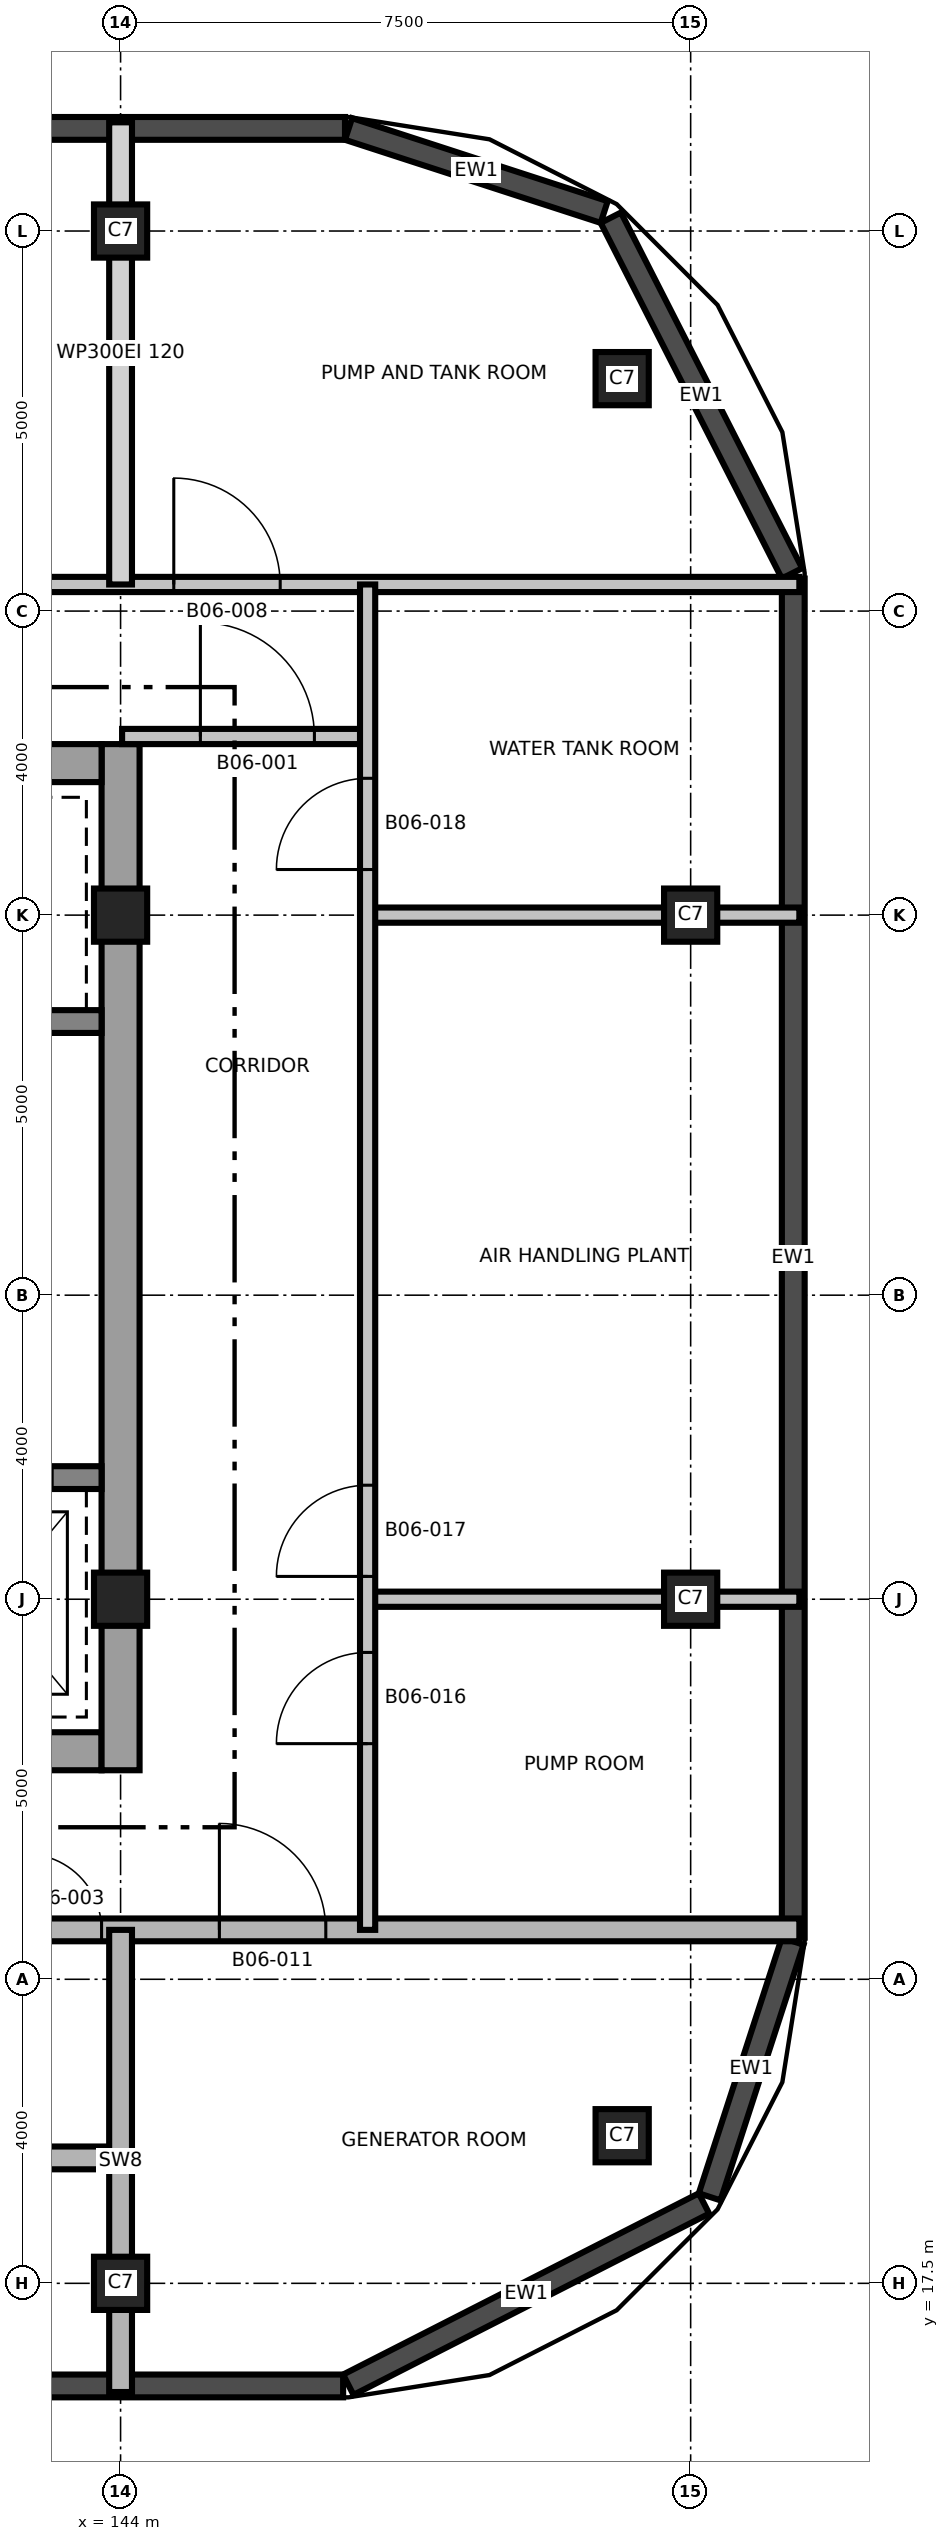
"""IFC4 building model, lengths in metres.
Left out: names, types, materials, properties, quantities, classifications, styles, units other than length and angle.
Written with IfcOpenShell. Run it as: python <this file> out.ifc"""

import sys

from ifc_helpers import new_model, si_unit, direction, frame, frame_2d, origin, origin_2d, place, context, subcontext, project, spatial, rectangle, extrude, element, fill, save


model = new_model("IFC4")
c1 = context("Model", 3, precision=1e-05, world=origin(), true_north=direction((0.0, 1.0)))
c2 = subcontext(c1, "Body", "Model", "MODEL_VIEW")
j1 = project(units=[si_unit("LENGTHUNIT", "METRE"), si_unit("PLANEANGLEUNIT", "RADIAN")], contexts=[c1])
p1 = place(None, origin())
s1 = spatial("IfcSite", under=j1, at=p1, CompositionType="ELEMENT")
p2 = place(p1, origin())
s2 = spatial("IfcBuilding", under=s1, at=p2, CompositionType="ELEMENT")
p3 = place(p2, frame((0.0, 0.0, 81.6)))
s3 = spatial("IfcBuildingStorey", under=s2, at=p3, CompositionType="ELEMENT", Elevation=81.6)
p4 = place(p3, frame((128.75, 24.5, 0.0), z_axis=(0.0, 0.0, 1.0), x_axis=(1.0, 0.0, 0.0)))
e1 = element("IfcWall", 1, at=p4, inside=s3, PredefinedType="SHEAR", context=c2, shape_type="SweptSolid", body=[
    extrude(rectangle(XDim=15.0, YDim=0.5, at=frame_2d((7.5, 0.0))), origin(), (0.0, 0.0, 1.0), 5.5),
])
p5 = place(p4, frame((9.65, 0.0, 0.0)))
e2 = element("IfcOpeningElement", 2, at=p5, cuts=e1, PredefinedType="OPENING", context=c2, shape_type="SweptSolid", body=[
    extrude(rectangle(XDim=1.5, YDim=2.1, at=frame_2d((0.75, 1.05))), frame((0.0, 0.26, 0.0), z_axis=(0.0, -1.0, 0.0), x_axis=(1.0, 0.0, 0.0)), (0.0, 0.0, 1.0), 0.52),
])
p6 = place(p4, frame((1.25, 0.0, 0.0)))
e3 = element("IfcOpeningElement", 3, at=p6, cuts=e1, PredefinedType="OPENING", context=c2, shape_type="SweptSolid", body=[
    extrude(rectangle(XDim=0.9, YDim=2.1, at=frame_2d((0.45, 1.05))), frame((0.0, 0.26, 0.0), z_axis=(0.0, -1.0, 0.0), x_axis=(1.0, 0.0, 0.0)), (0.0, 0.0, 1.0), 0.52),
])
p7 = place(p3, frame((144.0, 24.25, 0.0), z_axis=(0.0, 0.0, 1.0), x_axis=(0.0, 1.0, 0.0)))
e4 = element("IfcWall", 4, at=p7, inside=s3, PredefinedType="SHEAR", context=c2, shape_type="SweptSolid", body=[
    extrude(rectangle(XDim=13.5, YDim=0.5, at=frame_2d((6.75, 0.0))), origin(), (0.0, 0.0, 1.0), 5.5),
])
p8 = place(p3, frame((128.75, 37.5, 0.0), z_axis=(0.0, 0.0, 1.0), x_axis=(1.0, 0.0, 0.0)))
e5 = element("IfcWall", 5, at=p8, inside=s3, PredefinedType="SHEAR", context=c2, shape_type="SweptSolid", body=[
    extrude(rectangle(XDim=15.0, YDim=0.5, at=frame_2d((7.5, 0.0))), origin(), (0.0, 0.0, 1.0), 5.5),
])
p9 = place(p8, frame((9.65, 0.0, 0.0)))
e6 = element("IfcOpeningElement", 6, at=p9, cuts=e5, PredefinedType="OPENING", context=c2, shape_type="SweptSolid", body=[
    extrude(rectangle(XDim=1.5, YDim=2.1, at=frame_2d((0.75, 1.05))), frame((0.0, 0.26, 0.0), z_axis=(0.0, -1.0, 0.0), x_axis=(1.0, 0.0, 0.0)), (0.0, 0.0, 1.0), 0.52),
])
p10 = place(p8, frame((12.85, 0.0, 0.0)))
e7 = element("IfcOpeningElement", 7, at=p10, cuts=e5, PredefinedType="OPENING", context=c2, shape_type="SweptSolid", body=[
    extrude(rectangle(XDim=0.9, YDim=2.1, at=frame_2d((0.45, 1.05))), frame((0.0, 0.26, 0.0), z_axis=(0.0, -1.0, 0.0), x_axis=(1.0, 0.0, 0.0)), (0.0, 0.0, 1.0), 0.52),
])
p11 = place(p8, frame((3.8, 0.0, 0.0)))
e8 = element("IfcOpeningElement", 8, at=p11, cuts=e5, PredefinedType="OPENING", context=c2, shape_type="SweptSolid", body=[
    extrude(rectangle(XDim=0.9, YDim=2.1, at=frame_2d((0.45, 1.05))), frame((0.0, 0.26, 0.0), z_axis=(0.0, -1.0, 0.0), x_axis=(1.0, 0.0, 0.0)), (0.0, 0.0, 1.0), 0.52),
])
p12 = place(p8, frame((5.8, 0.0, 0.0)))
e9 = element("IfcOpeningElement", 9, at=p12, cuts=e5, PredefinedType="OPENING", context=c2, shape_type="SweptSolid", body=[
    extrude(rectangle(XDim=0.9, YDim=2.1, at=frame_2d((0.45, 1.05))), frame((0.0, 0.26, 0.0), z_axis=(0.0, -1.0, 0.0), x_axis=(1.0, 0.0, 0.0)), (0.0, 0.0, 1.0), 0.52),
])
p13 = place(p8, frame((7.55, 0.0, 0.0)))
e10 = element("IfcOpeningElement", 10, at=p13, cuts=e5, PredefinedType="OPENING", context=c2, shape_type="SweptSolid", body=[
    extrude(rectangle(XDim=0.9, YDim=2.1, at=frame_2d((0.45, 1.05))), frame((0.0, 0.26, 0.0), z_axis=(0.0, -1.0, 0.0), x_axis=(1.0, 0.0, 0.0)), (0.0, 0.0, 1.0), 0.52),
])
p14 = place(p3, frame((141.05, 28.1, 0.0), z_axis=(0.0, 0.0, 1.0), x_axis=(1.0, 0.0, 0.0)))
e11 = element("IfcWall", 11, at=p14, inside=s3, PredefinedType="SHEAR", context=c2, shape_type="SweptSolid", body=[
    extrude(rectangle(XDim=2.7, YDim=0.3, at=frame_2d((1.35, 0.0))), origin(), (0.0, 0.0, 1.0), 5.5),
])
p15 = place(p14, frame((0.75, 0.0, 0.0)))
e12 = element("IfcOpeningElement", 12, at=p15, cuts=e11, PredefinedType="OPENING", context=c2, shape_type="SweptSolid", body=[
    extrude(rectangle(XDim=1.3, YDim=2.4, at=frame_2d((0.65, 1.2))), frame((0.0, 0.16, 0.0), z_axis=(0.0, -1.0, 0.0), x_axis=(1.0, 0.0, 0.0)), (0.0, 0.0, 1.0), 0.32),
])
p16 = place(p3, frame((141.05, 34.1, 0.0), z_axis=(0.0, 0.0, 1.0), x_axis=(1.0, 0.0, 0.0)))
e13 = element("IfcWall", 13, at=p16, inside=s3, PredefinedType="SHEAR", context=c2, shape_type="SweptSolid", body=[
    extrude(rectangle(XDim=2.7, YDim=0.3, at=frame_2d((1.35, 0.0))), origin(), (0.0, 0.0, 1.0), 5.5),
])
for number, where, z_axis, x_axis in (
    (14, (144.0, 17.5, 0.0), (0.0, 0.0, 1.0), (1.0, 0.0, 0.0)),
    (15, (150.599, 19.442, 0.0), (0.0, 0.0, 1.0), (1.0, 0.0, 0.0)),
    (16, (144.0, 26.5, 0.0), (0.0, 0.0, 1.0), (1.0, 0.0, 0.0)),
    (17, (151.5, 26.5, 0.0), (0.0, 0.0, 1.0), (1.0, 0.0, 0.0)),
    (18, (144.0, 35.5, 0.0), (0.0, 0.0, 1.0), (1.0, 0.0, 0.0)),
    (19, (151.5, 35.5, 0.0), (0.0, 0.0, 1.0), (1.0, 0.0, 0.0)),
    (20, (150.599, 42.558, 0.0), (0.0, 0.0, 1.0), (1.0, 0.0, 0.0)),
    (21, (144.0, 44.5, 0.0), (0.0, 0.0, 1.0), (1.0, 0.0, 0.0)),
):
    element("IfcColumn", number, at=place(p3, frame(where, z_axis=z_axis, x_axis=x_axis)), inside=s3, PredefinedType="COLUMN", context=c2, shape_type="SweptSolid", body=[
        extrude(rectangle(XDim=0.7, YDim=0.7, at=origin_2d()), origin(), (0.0, 0.0, 1.0), 5.5),
    ])
p17 = place(p3, frame((126.048, 16.15, 0.0), z_axis=(0.0, 0.0, 1.0), x_axis=(1.0, 0.0, 0.0)))
e22 = element("IfcWall", 22, at=p17, inside=s3, PredefinedType="SOLIDWALL", context=c2, shape_type="SweptSolid", body=[
    extrude(rectangle(XDim=20.88, YDim=0.3, at=frame_2d((10.44, 0.0))), origin(), (0.0, 0.0, 1.0), 5.2),
])
p18 = place(p3, frame((146.996, 16.166, 0.0), z_axis=(0.0, 0.0, 1.0), x_axis=(0.890998339455, 0.454006562826, 0.0)))
e23 = element("IfcWall", 23, at=p18, inside=s3, PredefinedType="SOLIDWALL", context=c2, shape_type="SweptSolid", body=[
    extrude(rectangle(XDim=5.252, YDim=0.3, at=frame_2d((2.626, 0.0))), origin(), (0.0, 0.0, 1.0), 5.2),
])
p19 = place(p3, frame((151.75, 18.638, 0.0), z_axis=(0.0, 0.0, 1.0), x_axis=(0.309073584194, 0.951038127287, 0.0)))
e24 = element("IfcWall", 24, at=p19, inside=s3, PredefinedType="SOLIDWALL", context=c2, shape_type="SweptSolid", body=[
    extrude(rectangle(XDim=3.536, YDim=0.3, at=frame_2d((1.768, 0.0))), origin(), (0.0, 0.0, 1.0), 5.2),
])
p20 = place(p3, frame((152.85, 22.048, 0.0), z_axis=(0.0, 0.0, 1.0), x_axis=(0.0, 1.0, 0.0)))
e25 = element("IfcWall", 25, at=p20, inside=s3, PredefinedType="SOLIDWALL", context=c2, shape_type="SweptSolid", body=[
    extrude(rectangle(XDim=17.88, YDim=0.3, at=frame_2d((8.94, 0.0))), origin(), (0.0, 0.0, 1.0), 5.2),
])
p21 = place(p3, frame((152.834, 39.996, 0.0), z_axis=(0.0, 0.0, 1.0), x_axis=(-0.454006562826, 0.890998339455, 0.0)))
e26 = element("IfcWall", 26, at=p21, inside=s3, PredefinedType="SOLIDWALL", context=c2, shape_type="SweptSolid", body=[
    extrude(rectangle(XDim=5.252, YDim=0.3, at=frame_2d((2.626, 0.0))), origin(), (0.0, 0.0, 1.0), 5.2),
])
p22 = place(p3, frame((150.362, 44.75, 0.0), z_axis=(0.0, 0.0, 1.0), x_axis=(-0.951038127287, 0.309073584194, 0.0)))
e27 = element("IfcWall", 27, at=p22, inside=s3, PredefinedType="SOLIDWALL", context=c2, shape_type="SweptSolid", body=[
    extrude(rectangle(XDim=3.536, YDim=0.3, at=frame_2d((1.768, 0.0))), origin(), (0.0, 0.0, 1.0), 5.2),
])
p23 = place(p3, frame((146.952, 45.85, 0.0), z_axis=(0.0, 0.0, 1.0), x_axis=(-1.0, 0.0, 0.0)))
e28 = element("IfcWall", 28, at=p23, inside=s3, PredefinedType="SOLIDWALL", context=c2, shape_type="SweptSolid", body=[
    extrude(rectangle(XDim=20.88, YDim=0.3, at=frame_2d((10.44, 0.0))), origin(), (0.0, 0.0, 1.0), 5.2),
])
p24 = place(p3, frame((138.25, 19.15, 0.0), z_axis=(0.0, 0.0, 1.0), x_axis=(1.0, 0.0, 0.0)))
e29 = element("IfcWall", 29, at=p24, inside=s3, PredefinedType="SHEAR", context=c2, shape_type="SweptSolid", body=[
    extrude(rectangle(XDim=5.75, YDim=0.3, at=frame_2d((2.875, 0.0))), origin(), (0.0, 0.0, 1.0), 5.2),
])
p25 = place(p3, frame((120.07, 22.15, 0.0), z_axis=(0.0, 0.0, 1.0), x_axis=(1.0, 0.0, 0.0)))
e30 = element("IfcWall", 30, at=p25, inside=s3, PredefinedType="SHEAR", context=c2, shape_type="SweptSolid", body=[
    extrude(rectangle(XDim=32.86, YDim=0.3, at=frame_2d((16.43, 0.0))), origin(), (0.0, 0.0, 1.0), 5.2),
])
p26 = place(p25, frame((22.68, 0.0, 0.0)))
e31 = element("IfcOpeningElement", 31, at=p26, cuts=e30, PredefinedType="OPENING", context=c2, shape_type="SweptSolid", body=[
    extrude(rectangle(XDim=1.0, YDim=2.1, at=frame_2d((0.5, 1.05))), frame((0.0, 0.16, 0.0), z_axis=(0.0, -1.0, 0.0), x_axis=(1.0, 0.0, 0.0)), (0.0, 0.0, 1.0), 0.32),
])
p27 = place(p25, frame((6.73, 0.0, 0.0)))
e32 = element("IfcOpeningElement", 32, at=p27, cuts=e30, PredefinedType="OPENING", context=c2, shape_type="SweptSolid", body=[
    extrude(rectangle(XDim=1.4, YDim=2.1, at=frame_2d((0.7, 1.05))), frame((0.0, 0.16, 0.0), z_axis=(0.0, -1.0, 0.0), x_axis=(1.0, 0.0, 0.0)), (0.0, 0.0, 1.0), 0.32),
])
p28 = place(p25, frame((12.23, 0.0, 0.0)))
e33 = element("IfcOpeningElement", 33, at=p28, cuts=e30, PredefinedType="OPENING", context=c2, shape_type="SweptSolid", body=[
    extrude(rectangle(XDim=1.4, YDim=2.1, at=frame_2d((0.7, 1.05))), frame((0.0, 0.16, 0.0), z_axis=(0.0, -1.0, 0.0), x_axis=(1.0, 0.0, 0.0)), (0.0, 0.0, 1.0), 0.32),
])
p29 = place(p25, frame((25.23, 0.0, 0.0)))
e34 = element("IfcOpeningElement", 34, at=p29, cuts=e30, PredefinedType="OPENING", context=c2, shape_type="SweptSolid", body=[
    extrude(rectangle(XDim=1.4, YDim=2.1, at=frame_2d((0.7, 1.05))), frame((0.0, 0.16, 0.0), z_axis=(0.0, -1.0, 0.0), x_axis=(1.0, 0.0, 0.0)), (0.0, 0.0, 1.0), 0.32),
])
p30 = place(p25, frame((16.68, 0.0, 0.0)))
e35 = element("IfcOpeningElement", 35, at=p30, cuts=e30, PredefinedType="OPENING", context=c2, shape_type="SweptSolid", body=[
    extrude(rectangle(XDim=0.9, YDim=2.1, at=frame_2d((0.45, 1.05))), frame((0.0, 0.16, 0.0), z_axis=(0.0, -1.0, 0.0), x_axis=(1.0, 0.0, 0.0)), (0.0, 0.0, 1.0), 0.32),
])
for number, where, z_axis, x_axis in (
    (36, (147.25, 26.5, 0.0), (0.0, 0.0, 1.0), (1.0, 0.0, 0.0)),
    (37, (147.25, 35.5, 0.0), (0.0, 0.0, 1.0), (1.0, 0.0, 0.0)),
):
    element("IfcWall", number, at=place(p3, frame(where, z_axis=z_axis, x_axis=x_axis)), inside=s3, PredefinedType="PARTITIONING", context=c2, shape_type="SweptSolid", body=[
        extrude(rectangle(XDim=5.68, YDim=0.2, at=frame_2d((2.84, 0.0))), origin(), (0.0, 0.0, 1.0), 5.2),
    ])
p31 = place(p3, frame((144.02, 37.85, 0.0), z_axis=(0.0, 0.0, 1.0), x_axis=(1.0, 0.0, 0.0)))
e38 = element("IfcWall", 38, at=p31, inside=s3, PredefinedType="PARTITIONING", context=c2, shape_type="SweptSolid", body=[
    extrude(rectangle(XDim=3.23, YDim=0.2, at=frame_2d((1.615, 0.0))), origin(), (0.0, 0.0, 1.0), 5.2),
])
p32 = place(p31, frame((1.03, 0.0, 0.0)))
e39 = element("IfcOpeningElement", 39, at=p32, cuts=e38, PredefinedType="OPENING", context=c2, shape_type="SweptSolid", body=[
    extrude(rectangle(XDim=1.5, YDim=2.1, at=frame_2d((0.75, 1.05))), frame((0.0, 0.11, 0.0), z_axis=(0.0, -1.0, 0.0), x_axis=(1.0, 0.0, 0.0)), (0.0, 0.0, 1.0), 0.22),
])
p33 = place(p3, frame((120.07, 39.85, 0.0), z_axis=(0.0, 0.0, 1.0), x_axis=(1.0, 0.0, 0.0)))
e40 = element("IfcWall", 40, at=p33, inside=s3, PredefinedType="PARTITIONING", context=c2, shape_type="SweptSolid", body=[
    extrude(rectangle(XDim=32.86, YDim=0.2, at=frame_2d((16.43, 0.0))), origin(), (0.0, 0.0, 1.0), 5.2),
])
p34 = place(p33, frame((11.23, 0.0, 0.0)))
e41 = element("IfcOpeningElement", 41, at=p34, cuts=e40, PredefinedType="OPENING", context=c2, shape_type="SweptSolid", body=[
    extrude(rectangle(XDim=1.4, YDim=2.1, at=frame_2d((0.7, 1.05))), frame((0.0, 0.11, 0.0), z_axis=(0.0, -1.0, 0.0), x_axis=(1.0, 0.0, 0.0)), (0.0, 0.0, 1.0), 0.22),
])
p35 = place(p33, frame((19.23, 0.0, 0.0)))
e42 = element("IfcOpeningElement", 42, at=p35, cuts=e40, PredefinedType="OPENING", context=c2, shape_type="SweptSolid", body=[
    extrude(rectangle(XDim=1.4, YDim=2.1, at=frame_2d((0.7, 1.05))), frame((0.0, 0.11, 0.0), z_axis=(0.0, -1.0, 0.0), x_axis=(1.0, 0.0, 0.0)), (0.0, 0.0, 1.0), 0.22),
])
p36 = place(p33, frame((24.63, 0.0, 0.0)))
e43 = element("IfcOpeningElement", 43, at=p36, cuts=e40, PredefinedType="OPENING", context=c2, shape_type="SweptSolid", body=[
    extrude(rectangle(XDim=1.4, YDim=2.1, at=frame_2d((0.7, 1.05))), frame((0.0, 0.11, 0.0), z_axis=(0.0, -1.0, 0.0), x_axis=(1.0, 0.0, 0.0)), (0.0, 0.0, 1.0), 0.22),
])
p37 = place(p3, frame((144.0, 16.07, 0.0), z_axis=(0.0, 0.0, 1.0), x_axis=(0.0, 1.0, 0.0)))
e44 = element("IfcWall", 44, at=p37, inside=s3, PredefinedType="SHEAR", context=c2, shape_type="SweptSolid", body=[
    extrude(rectangle(XDim=6.08, YDim=0.3, at=frame_2d((3.04, 0.0))), origin(), (0.0, 0.0, 1.0), 5.2),
])
p38 = place(p3, frame((144.0, 39.85, 0.0), z_axis=(0.0, 0.0, 1.0), x_axis=(0.0, 1.0, 0.0)))
e45 = element("IfcWall", 45, at=p38, inside=s3, PredefinedType="PARTITIONING", context=c2, shape_type="SweptSolid", body=[
    extrude(rectangle(XDim=6.08, YDim=0.3, at=frame_2d((3.04, 0.0))), origin(), (0.0, 0.0, 1.0), 5.2),
])
p39 = place(p3, frame((147.25, 22.15, 0.0), z_axis=(0.0, 0.0, 1.0), x_axis=(0.0, 1.0, 0.0)))
e46 = element("IfcWall", 46, at=p39, inside=s3, PredefinedType="PARTITIONING", context=c2, shape_type="SweptSolid", body=[
    extrude(rectangle(XDim=17.7, YDim=0.2, at=frame_2d((8.85, 0.0))), origin(), (0.0, 0.0, 1.0), 5.2),
])
p40 = place(p39, frame((2.45, 0.0, 0.0)))
e47 = element("IfcOpeningElement", 47, at=p40, cuts=e46, PredefinedType="OPENING", context=c2, shape_type="SweptSolid", body=[
    extrude(rectangle(XDim=1.2, YDim=2.1, at=frame_2d((0.6, 1.05))), frame((0.0, 0.11, 0.0), z_axis=(0.0, -1.0, 0.0), x_axis=(1.0, 0.0, 0.0)), (0.0, 0.0, 1.0), 0.22),
])
p41 = place(p39, frame((4.65, 0.0, 0.0)))
e48 = element("IfcOpeningElement", 48, at=p41, cuts=e46, PredefinedType="OPENING", context=c2, shape_type="SweptSolid", body=[
    extrude(rectangle(XDim=1.2, YDim=2.1, at=frame_2d((0.6, 1.05))), frame((0.0, 0.11, 0.0), z_axis=(0.0, -1.0, 0.0), x_axis=(1.0, 0.0, 0.0)), (0.0, 0.0, 1.0), 0.22),
])
p42 = place(p39, frame((13.95, 0.0, 0.0)))
e49 = element("IfcOpeningElement", 49, at=p42, cuts=e46, PredefinedType="OPENING", context=c2, shape_type="SweptSolid", body=[
    extrude(rectangle(XDim=1.2, YDim=2.1, at=frame_2d((0.6, 1.05))), frame((0.0, 0.11, 0.0), z_axis=(0.0, -1.0, 0.0), x_axis=(1.0, 0.0, 0.0)), (0.0, 0.0, 1.0), 0.22),
])
p43 = place(p32, origin())
e50 = element("IfcDoor", 50, at=p43, inside=s3, OperationType="SINGLE_SWING_LEFT", PredefinedType="DOOR", context=c2, shape_type="SweptSolid", body=[
    extrude(rectangle(XDim=1.5, YDim=2.1, at=frame_2d((0.75, 1.05))), frame((0.0, 0.025, 0.0), z_axis=(0.0, -1.0, 0.0), x_axis=(1.0, 0.0, 0.0)), (0.0, 0.0, 1.0), 0.05),
])
fill(e39, e50)
p44 = place(p26, origin())
e51 = element("IfcDoor", 51, at=p44, inside=s3, OperationType="SINGLE_SWING_LEFT", PredefinedType="DOOR", context=c2, shape_type="SweptSolid", body=[
    extrude(rectangle(XDim=1.0, YDim=2.1, at=frame_2d((0.5, 1.05))), frame((0.0, 0.025, 0.0), z_axis=(0.0, -1.0, 0.0), x_axis=(1.0, 0.0, 0.0)), (0.0, 0.0, 1.0), 0.05),
])
fill(e31, e51)
p45 = place(p36, origin())
e52 = element("IfcDoor", 52, at=p45, inside=s3, OperationType="SINGLE_SWING_RIGHT", PredefinedType="DOOR", context=c2, shape_type="SweptSolid", body=[
    extrude(rectangle(XDim=1.4, YDim=2.1, at=frame_2d((0.7, 1.05))), frame((0.0, 0.025, 0.0), z_axis=(0.0, -1.0, 0.0), x_axis=(1.0, 0.0, 0.0)), (0.0, 0.0, 1.0), 0.05),
])
fill(e43, e52)
p46 = place(p29, origin())
e53 = element("IfcDoor", 53, at=p46, inside=s3, OperationType="SINGLE_SWING_LEFT", PredefinedType="DOOR", context=c2, shape_type="SweptSolid", body=[
    extrude(rectangle(XDim=1.4, YDim=2.1, at=frame_2d((0.7, 1.05))), frame((0.0, 0.025, 0.0), z_axis=(0.0, -1.0, 0.0), x_axis=(1.0, 0.0, 0.0)), (0.0, 0.0, 1.0), 0.05),
])
fill(e34, e53)
p47 = place(p40, origin())
e54 = element("IfcDoor", 54, at=p47, inside=s3, OperationType="SINGLE_SWING_RIGHT", PredefinedType="DOOR", context=c2, shape_type="SweptSolid", body=[
    extrude(rectangle(XDim=1.2, YDim=2.1, at=frame_2d((0.6, 1.05))), frame((0.0, 0.025, 0.0), z_axis=(0.0, -1.0, 0.0), x_axis=(1.0, 0.0, 0.0)), (0.0, 0.0, 1.0), 0.05),
])
fill(e47, e54)
p48 = place(p41, origin())
e55 = element("IfcDoor", 55, at=p48, inside=s3, OperationType="SINGLE_SWING_LEFT", PredefinedType="DOOR", context=c2, shape_type="SweptSolid", body=[
    extrude(rectangle(XDim=1.2, YDim=2.1, at=frame_2d((0.6, 1.05))), frame((0.0, 0.025, 0.0), z_axis=(0.0, -1.0, 0.0), x_axis=(1.0, 0.0, 0.0)), (0.0, 0.0, 1.0), 0.05),
])
fill(e48, e55)
p49 = place(p42, origin())
e56 = element("IfcDoor", 56, at=p49, inside=s3, OperationType="SINGLE_SWING_RIGHT", PredefinedType="DOOR", context=c2, shape_type="SweptSolid", body=[
    extrude(rectangle(XDim=1.2, YDim=2.1, at=frame_2d((0.6, 1.05))), frame((0.0, 0.025, 0.0), z_axis=(0.0, -1.0, 0.0), x_axis=(1.0, 0.0, 0.0)), (0.0, 0.0, 1.0), 0.05),
])
fill(e49, e56)
save(model, sys.argv[1])
